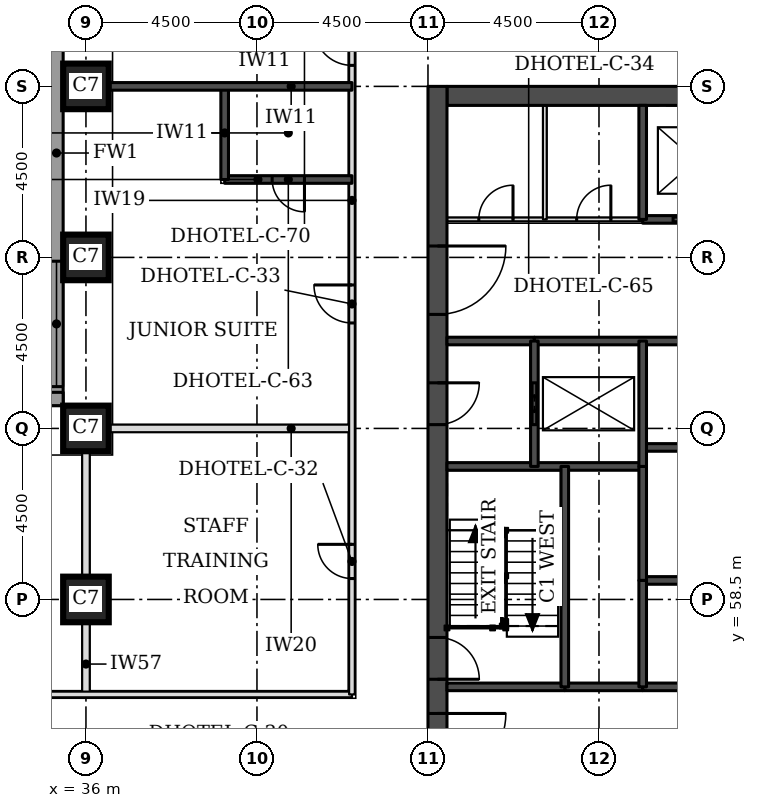
"""IFC4 building model, lengths in metres.
Left out: names, types, materials, properties, quantities, classifications, styles, units other than length and angle.
Written with IfcOpenShell. Run it as: python <this file> out.ifc"""

import sys

from ifc_helpers import new_model, si_unit, direction, frame, frame_2d, origin, origin_2d, place, context, subcontext, project, spatial, rectangle, extrude, element, fill, save


model = new_model("IFC4")
c1 = context("Model", 3, precision=1e-05, world=origin(), true_north=direction((0.0, 1.0)))
c2 = subcontext(c1, "Body", "Model", "MODEL_VIEW")
j1 = project(units=[si_unit("LENGTHUNIT", "METRE"), si_unit("PLANEANGLEUNIT", "RADIAN")], contexts=[c1])
p1 = place(None, origin())
s1 = spatial("IfcSite", under=j1, at=p1, CompositionType="ELEMENT")
p2 = place(p1, origin())
s2 = spatial("IfcBuilding", under=s1, at=p2, CompositionType="ELEMENT")
p3 = place(p2, frame((0.0, 0.0, 56.1)))
s3 = spatial("IfcBuildingStorey", under=s2, at=p3, CompositionType="ELEMENT", Elevation=56.1)
for number, where, z_axis, x_axis in (
    (1, (36.0, 58.5, 0.0), (0.0, 0.0, 1.0), (1.0, 0.0, 0.0)),
    (2, (36.0, 63.0, 0.0), (0.0, 0.0, 1.0), (1.0, 0.0, 0.0)),
    (3, (36.0, 67.5, 0.0), (0.0, 0.0, 1.0), (1.0, 0.0, 0.0)),
    (4, (36.0, 72.0, 0.0), (0.0, 0.0, 1.0), (1.0, 0.0, 0.0)),
):
    element("IfcColumn", number, at=place(p3, frame(where, z_axis=z_axis, x_axis=x_axis)), inside=s3, PredefinedType="COLUMN", context=c2, shape_type="SweptSolid", body=[
        extrude(rectangle(XDim=1.2, YDim=1.2, at=origin_2d()), origin(), (0.0, 0.0, 1.0), 3.3),
    ])
p4 = place(p3, frame((45.5, 71.75, 0.0), z_axis=(0.0, 0.0, 1.0), x_axis=(1.0, 0.0, 0.0)))
e5 = element("IfcWall", 5, at=p4, inside=s3, PredefinedType="SHEAR", context=c2, shape_type="SweptSolid", body=[
    extrude(rectangle(XDim=21.5, YDim=0.5, at=frame_2d((10.75, 0.0))), origin(), (0.0, 0.0, 1.0), 3.3),
])
p5 = place(p3, frame((45.25, 49.5, 0.0), z_axis=(0.0, 0.0, 1.0), x_axis=(0.0, 1.0, 0.0)))
e6 = element("IfcWall", 6, at=p5, inside=s3, PredefinedType="SHEAR", context=c2, shape_type="SweptSolid", body=[
    extrude(rectangle(XDim=22.5, YDim=0.5, at=frame_2d((11.25, 0.0))), origin(), (0.0, 0.0, 1.0), 3.3),
])
p6 = place(p5, frame((4.2, 0.0, 0.0)))
e7 = element("IfcOpeningElement", 7, at=p6, cuts=e6, PredefinedType="OPENING", context=c2, shape_type="SweptSolid", body=[
    extrude(rectangle(XDim=1.8, YDim=2.1, at=frame_2d((0.9, 1.05))), frame((0.0, 0.26, 0.0), z_axis=(0.0, -1.0, 0.0), x_axis=(1.0, 0.0, 0.0)), (0.0, 0.0, 1.0), 0.52),
])
p7 = place(p5, frame((6.9, 0.0, 0.0)))
e8 = element("IfcOpeningElement", 8, at=p7, cuts=e6, PredefinedType="OPENING", context=c2, shape_type="SweptSolid", body=[
    extrude(rectangle(XDim=1.1, YDim=2.1, at=frame_2d((0.55, 1.05))), frame((0.0, 0.26, 0.0), z_axis=(0.0, -1.0, 0.0), x_axis=(1.0, 0.0, 0.0)), (0.0, 0.0, 1.0), 0.52),
])
p8 = place(p5, frame((13.6, 0.0, 0.0)))
e9 = element("IfcOpeningElement", 9, at=p8, cuts=e6, PredefinedType="OPENING", context=c2, shape_type="SweptSolid", body=[
    extrude(rectangle(XDim=1.1, YDim=2.1, at=frame_2d((0.55, 1.05))), frame((0.0, 0.26, 0.0), z_axis=(0.0, -1.0, 0.0), x_axis=(1.0, 0.0, 0.0)), (0.0, 0.0, 1.0), 0.52),
])
p9 = place(p5, frame((16.5, 0.0, 0.0)))
e10 = element("IfcOpeningElement", 10, at=p9, cuts=e6, PredefinedType="OPENING", context=c2, shape_type="SweptSolid", body=[
    extrude(rectangle(XDim=1.8, YDim=2.1, at=frame_2d((0.9, 1.05))), frame((0.0, 0.26, 0.0), z_axis=(0.0, -1.0, 0.0), x_axis=(1.0, 0.0, 0.0)), (0.0, 0.0, 1.0), 0.52),
])
p10 = place(p3, frame((35.225, 76.894, 0.0), z_axis=(0.0, 0.0, 1.0), x_axis=(0.0, -1.0, 0.0)))
e11 = element("IfcWall", 11, at=p10, inside=s3, PredefinedType="STANDARD", context=c2, shape_type="SweptSolid", body=[
    extrude(rectangle(XDim=13.293, YDim=0.35, at=frame_2d((6.647, 0.0))), origin(), (0.0, 0.0, 1.0), 3.055),
])
p11 = place(p10, frame((9.493, 0.0, 0.8)))
e12 = element("IfcOpeningElement", 12, at=p11, cuts=e11, PredefinedType="OPENING", context=c2, shape_type="SweptSolid", body=[
    extrude(rectangle(XDim=3.3, YDim=1.5, at=frame_2d((1.65, 0.75))), frame((0.0, 0.185, 0.0), z_axis=(0.0, -1.0, 0.0), x_axis=(1.0, 0.0, 0.0)), (0.0, 0.0, 1.0), 0.37),
])
p12 = place(p3, frame((35.4, 63.775, 0.0), z_axis=(0.0, 0.0, 1.0), x_axis=(-1.0, 0.0, 0.0)))
e13 = element("IfcWall", 13, at=p12, inside=s3, PredefinedType="STANDARD", context=c2, shape_type="SweptSolid", body=[
    extrude(rectangle(XDim=17.793, YDim=0.35, at=frame_2d((8.897, 0.0))), origin(), (0.0, 0.0, 1.0), 3.055),
])
p13 = place(p12, frame((0.5, 0.0, 0.8)))
e14 = element("IfcOpeningElement", 14, at=p13, cuts=e13, PredefinedType="OPENING", context=c2, shape_type="SweptSolid", body=[
    extrude(rectangle(XDim=3.3, YDim=1.5, at=frame_2d((1.65, 0.75))), frame((0.0, 0.185, 0.0), z_axis=(0.0, -1.0, 0.0), x_axis=(1.0, 0.0, 0.0)), (0.0, 0.0, 1.0), 0.37),
])
p14 = place(p12, frame((9.0, 0.0, 0.8)))
e15 = element("IfcOpeningElement", 15, at=p14, cuts=e13, PredefinedType="OPENING", context=c2, shape_type="SweptSolid", body=[
    extrude(rectangle(XDim=3.3, YDim=1.5, at=frame_2d((1.65, 0.75))), frame((0.0, 0.185, 0.0), z_axis=(0.0, -1.0, 0.0), x_axis=(1.0, 0.0, 0.0)), (0.0, 0.0, 1.0), 0.37),
])
p15 = place(p3, frame((36.0, 56.0, 0.0), z_axis=(0.0, 0.0, 1.0), x_axis=(0.0, 1.0, 0.0)))
e16 = element("IfcWall", 16, at=p15, inside=s3, PredefinedType="PARTITIONING", context=c2, shape_type="SweptSolid", body=[
    extrude(rectangle(XDim=6.4, YDim=0.2, at=frame_2d((3.2, 0.0))), origin(), (0.0, 0.0, 1.0), 2.33),
])
p16 = place(p3, frame((36.6, 63.0, 0.0), z_axis=(0.0, 0.0, 1.0), x_axis=(1.0, 0.0, 0.0)))
e17 = element("IfcWall", 17, at=p16, inside=s3, PredefinedType="PARTITIONING", context=c2, shape_type="SweptSolid", body=[
    extrude(rectangle(XDim=6.4, YDim=0.2, at=frame_2d((3.2, 0.0))), origin(), (0.0, 0.0, 1.0), 3.08),
])
p17 = place(p3, frame((27.0, 56.0, 0.0), z_axis=(0.0, 0.0, 1.0), x_axis=(1.0, 0.0, 0.0)))
e18 = element("IfcWall", 18, at=p17, inside=s3, PredefinedType="PARTITIONING", context=c2, shape_type="SweptSolid", body=[
    extrude(rectangle(XDim=16.0, YDim=0.15, at=frame_2d((8.0, 0.0))), origin(), (0.0, 0.0, 1.0), 3.08),
])
p18 = place(p17, frame((5.225, 0.0, 0.0)))
e19 = element("IfcOpeningElement", 19, at=p18, cuts=e18, PredefinedType="OPENING", context=c2, shape_type="SweptSolid", body=[
    extrude(rectangle(XDim=1.0, YDim=2.1, at=frame_2d((0.5, 1.05))), frame((0.0, 0.085, 0.0), z_axis=(0.0, -1.0, 0.0), x_axis=(1.0, 0.0, 0.0)), (0.0, 0.0, 1.0), 0.17),
])
p19 = place(p3, frame((43.0, 56.0, 0.0), z_axis=(0.0, 0.0, 1.0), x_axis=(0.0, 1.0, 0.0)))
e20 = element("IfcWall", 20, at=p19, inside=s3, PredefinedType="PARTITIONING", context=c2, shape_type="SweptSolid", body=[
    extrude(rectangle(XDim=18.0, YDim=0.15, at=frame_2d((9.0, 0.0))), origin(), (0.0, 0.0, 1.0), 3.08),
])
p20 = place(p19, frame((9.775, 0.0, 0.0)))
e21 = element("IfcOpeningElement", 21, at=p20, cuts=e20, PredefinedType="OPENING", context=c2, shape_type="SweptSolid", body=[
    extrude(rectangle(XDim=1.0, YDim=2.1, at=frame_2d((0.5, 1.05))), frame((0.0, 0.085, 0.0), z_axis=(0.0, -1.0, 0.0), x_axis=(1.0, 0.0, 0.0)), (0.0, 0.0, 1.0), 0.17),
])
p21 = place(p19, frame((16.553, 0.0, 0.0)))
e22 = element("IfcOpeningElement", 22, at=p21, cuts=e20, PredefinedType="OPENING", context=c2, shape_type="SweptSolid", body=[
    extrude(rectangle(XDim=1.0, YDim=2.1, at=frame_2d((0.5, 1.05))), frame((0.0, 0.085, 0.0), z_axis=(0.0, -1.0, 0.0), x_axis=(1.0, 0.0, 0.0)), (0.0, 0.0, 1.0), 0.17),
])
p22 = place(p19, frame((3.05, 0.0, 0.0)))
e23 = element("IfcOpeningElement", 23, at=p22, cuts=e20, PredefinedType="OPENING", context=c2, shape_type="SweptSolid", body=[
    extrude(rectangle(XDim=0.9, YDim=2.1, at=frame_2d((0.45, 1.05))), frame((0.0, 0.085, 0.0), z_axis=(0.0, -1.0, 0.0), x_axis=(1.0, 0.0, 0.0)), (0.0, 0.0, 1.0), 0.17),
])
p23 = place(p3, frame((39.65, 69.55, 0.0), z_axis=(0.0, 0.0, 1.0), x_axis=(1.0, 0.0, 0.0)))
e24 = element("IfcWall", 24, at=p23, inside=s3, PredefinedType="SOLIDWALL", context=c2, shape_type="SweptSolid", body=[
    extrude(rectangle(XDim=3.35, YDim=0.2, at=frame_2d((1.675, 0.0))), origin(), (0.0, 0.0, 1.0), 3.08),
])
p24 = place(p23, frame((1.25, 0.0, 0.0)))
e25 = element("IfcOpeningElement", 25, at=p24, cuts=e24, PredefinedType="OPENING", context=c2, shape_type="SweptSolid", body=[
    extrude(rectangle(XDim=0.85, YDim=2.1, at=frame_2d((0.425, 1.05))), frame((0.0, 0.11, 0.0), z_axis=(0.0, -1.0, 0.0), x_axis=(1.0, 0.0, 0.0)), (0.0, 0.0, 1.0), 0.22),
])
p25 = place(p3, frame((39.65, 69.55, 0.0), z_axis=(0.0, 0.0, 1.0), x_axis=(0.0, 1.0, 0.0)))
e26 = element("IfcWall", 26, at=p25, inside=s3, PredefinedType="SOLIDWALL", context=c2, shape_type="SweptSolid", body=[
    extrude(rectangle(XDim=2.45, YDim=0.2, at=frame_2d((1.225, 0.0))), origin(), (0.0, 0.0, 1.0), 3.08),
])
p26 = place(p3, frame((36.6, 72.0, 0.0), z_axis=(0.0, 0.0, 1.0), x_axis=(1.0, 0.0, 0.0)))
e27 = element("IfcWall", 27, at=p26, inside=s3, PredefinedType="SOLIDWALL", context=c2, shape_type="SweptSolid", body=[
    extrude(rectangle(XDim=6.4, YDim=0.2, at=frame_2d((3.2, 0.0))), origin(), (0.0, 0.0, 1.0), 3.08),
])
p27 = place(p3, frame((48.6, 56.2, 0.0), z_axis=(0.0, 0.0, 1.0), x_axis=(1.0, 0.0, 0.0)))
e28 = element("IfcWall", 28, at=p27, inside=s3, PredefinedType="SOLIDWALL", context=c2, shape_type="SweptSolid", body=[
    extrude(rectangle(XDim=2.05, YDim=0.2, at=frame_2d((1.025, 0.0))), origin(), (0.0, 0.0, 1.0), 3.08),
])
p28 = place(p3, frame((45.5, 56.2, 0.0), z_axis=(0.0, 0.0, 1.0), x_axis=(1.0, 0.0, 0.0)))
e29 = element("IfcWall", 29, at=p28, inside=s3, PredefinedType="SOLIDWALL", context=c2, shape_type="SweptSolid", body=[
    extrude(rectangle(XDim=3.1, YDim=0.2, at=frame_2d((1.55, 0.0))), origin(), (0.0, 0.0, 1.0), 3.08),
])
p29 = place(p3, frame((50.65, 56.2, 0.0), z_axis=(0.0, 0.0, 1.0), x_axis=(1.0, 0.0, 0.0)))
e30 = element("IfcWall", 30, at=p29, inside=s3, PredefinedType="SOLIDWALL", context=c2, shape_type="SweptSolid", body=[
    extrude(rectangle(XDim=11.2, YDim=0.2, at=frame_2d((5.6, 0.0))), origin(), (0.0, 0.0, 1.0), 3.08),
])
p30 = place(p3, frame((50.65, 59.0, 0.0), z_axis=(0.0, 0.0, 1.0), x_axis=(1.0, 0.0, 0.0)))
e31 = element("IfcWall", 31, at=p30, inside=s3, PredefinedType="SOLIDWALL", context=c2, shape_type="SweptSolid", body=[
    extrude(rectangle(XDim=11.2, YDim=0.2, at=frame_2d((5.6, 0.0))), origin(), (0.0, 0.0, 1.0), 3.3),
])
p31 = place(p3, frame((45.5, 62.0, 0.0), z_axis=(0.0, 0.0, 1.0), x_axis=(1.0, 0.0, 0.0)))
e32 = element("IfcWall", 32, at=p31, inside=s3, PredefinedType="SOLIDWALL", context=c2, shape_type="SweptSolid", body=[
    extrude(rectangle(XDim=5.15, YDim=0.2, at=frame_2d((2.575, 0.0))), origin(), (0.0, 0.0, 1.0), 3.08),
])
p32 = place(p3, frame((50.65, 62.5, 0.0), z_axis=(0.0, 0.0, 1.0), x_axis=(1.0, 0.0, 0.0)))
e33 = element("IfcWall", 33, at=p32, inside=s3, PredefinedType="SOLIDWALL", context=c2, shape_type="SweptSolid", body=[
    extrude(rectangle(XDim=11.2, YDim=0.2, at=frame_2d((5.6, 0.0))), origin(), (0.0, 0.0, 1.0), 3.3),
])
p33 = place(p3, frame((45.5, 65.3, 0.0), z_axis=(0.0, 0.0, 1.0), x_axis=(1.0, 0.0, 0.0)))
e34 = element("IfcWall", 34, at=p33, inside=s3, PredefinedType="SOLIDWALL", context=c2, shape_type="SweptSolid", body=[
    extrude(rectangle(XDim=2.3, YDim=0.2, at=frame_2d((1.15, 0.0))), origin(), (0.0, 0.0, 1.0), 3.08),
])
p34 = place(p3, frame((47.8, 65.3, 0.0), z_axis=(0.0, 0.0, 1.0), x_axis=(1.0, 0.0, 0.0)))
e35 = element("IfcWall", 35, at=p34, inside=s3, PredefinedType="SOLIDWALL", context=c2, shape_type="SweptSolid", body=[
    extrude(rectangle(XDim=16.9, YDim=0.2, at=frame_2d((8.45, 0.0))), origin(), (0.0, 0.0, 1.0), 3.08),
])
p35 = place(p3, frame((45.5, 68.5, 0.0), z_axis=(0.0, 0.0, 1.0), x_axis=(1.0, 0.0, 0.0)))
e36 = element("IfcWall", 36, at=p35, inside=s3, PredefinedType="PARTITIONING", context=c2, shape_type="SweptSolid", body=[
    extrude(rectangle(XDim=5.15, YDim=0.1, at=frame_2d((2.575, 0.0))), origin(), (0.0, 0.0, 1.0), 3.08),
])
p36 = place(p35, frame((0.837, 0.0, 0.0)))
e37 = element("IfcOpeningElement", 37, at=p36, cuts=e36, PredefinedType="OPENING", context=c2, shape_type="SweptSolid", body=[
    extrude(rectangle(XDim=0.9, YDim=2.1, at=frame_2d((0.45, 1.05))), frame((0.0, 0.06, 0.0), z_axis=(0.0, -1.0, 0.0), x_axis=(1.0, 0.0, 0.0)), (0.0, 0.0, 1.0), 0.12),
])
p37 = place(p35, frame((3.413, 0.0, 0.0)))
e38 = element("IfcOpeningElement", 38, at=p37, cuts=e36, PredefinedType="OPENING", context=c2, shape_type="SweptSolid", body=[
    extrude(rectangle(XDim=0.9, YDim=2.1, at=frame_2d((0.45, 1.05))), frame((0.0, 0.06, 0.0), z_axis=(0.0, -1.0, 0.0), x_axis=(1.0, 0.0, 0.0)), (0.0, 0.0, 1.0), 0.12),
])
p38 = place(p3, frame((50.65, 68.5, 0.0), z_axis=(0.0, 0.0, 1.0), x_axis=(1.0, 0.0, 0.0)))
e39 = element("IfcWall", 39, at=p38, inside=s3, PredefinedType="SOLIDWALL", context=c2, shape_type="SweptSolid", body=[
    extrude(rectangle(XDim=11.2, YDim=0.2, at=frame_2d((5.6, 0.0))), origin(), (0.0, 0.0, 1.0), 3.08),
])
p39 = place(p38, frame((0.8, 0.0, 0.0)))
e40 = element("IfcOpeningElement", 40, at=p39, cuts=e39, PredefinedType="OPENING", context=c2, shape_type="SweptSolid", body=[
    extrude(rectangle(XDim=1.2, YDim=2.1, at=frame_2d((0.6, 1.05))), frame((0.0, 0.11, 0.0), z_axis=(0.0, -1.0, 0.0), x_axis=(1.0, 0.0, 0.0)), (0.0, 0.0, 1.0), 0.22),
])
p40 = place(p38, frame((3.6, 0.0, 0.0)))
e41 = element("IfcOpeningElement", 41, at=p40, cuts=e39, PredefinedType="OPENING", context=c2, shape_type="SweptSolid", body=[
    extrude(rectangle(XDim=1.2, YDim=2.1, at=frame_2d((0.6, 1.05))), frame((0.0, 0.11, 0.0), z_axis=(0.0, -1.0, 0.0), x_axis=(1.0, 0.0, 0.0)), (0.0, 0.0, 1.0), 0.22),
])
p41 = place(p38, frame((6.4, 0.0, 0.0)))
e42 = element("IfcOpeningElement", 42, at=p41, cuts=e39, PredefinedType="OPENING", context=c2, shape_type="SweptSolid", body=[
    extrude(rectangle(XDim=1.2, YDim=2.1, at=frame_2d((0.6, 1.05))), frame((0.0, 0.11, 0.0), z_axis=(0.0, -1.0, 0.0), x_axis=(1.0, 0.0, 0.0)), (0.0, 0.0, 1.0), 0.22),
])
p42 = place(p38, frame((9.2, 0.0, 0.0)))
e43 = element("IfcOpeningElement", 43, at=p42, cuts=e39, PredefinedType="OPENING", context=c2, shape_type="SweptSolid", body=[
    extrude(rectangle(XDim=1.2, YDim=2.1, at=frame_2d((0.6, 1.05))), frame((0.0, 0.11, 0.0), z_axis=(0.0, -1.0, 0.0), x_axis=(1.0, 0.0, 0.0)), (0.0, 0.0, 1.0), 0.22),
])
p43 = place(p3, frame((47.8, 62.0, 0.0), z_axis=(0.0, 0.0, 1.0), x_axis=(0.0, 1.0, 0.0)))
e44 = element("IfcWall", 44, at=p43, inside=s3, PredefinedType="SOLIDWALL", context=c2, shape_type="SweptSolid", body=[
    extrude(rectangle(XDim=3.3, YDim=0.2, at=frame_2d((1.65, 0.0))), origin(), (0.0, 0.0, 1.0), 3.08),
])
p44 = place(p43, frame((1.1, 0.0, 0.0)))
e45 = element("IfcOpeningElement", 45, at=p44, cuts=e44, PredefinedType="OPENING", context=c2, shape_type="SweptSolid", body=[
    extrude(rectangle(XDim=1.1, YDim=2.1, at=frame_2d((0.55, 1.05))), frame((0.0, 0.11, 0.0), z_axis=(0.0, -1.0, 0.0), x_axis=(1.0, 0.0, 0.0)), (0.0, 0.0, 1.0), 0.22),
])
p45 = place(p3, frame((48.075, 68.5, 0.0), z_axis=(0.0, 0.0, 1.0), x_axis=(0.0, 1.0, 0.0)))
e46 = element("IfcWall", 46, at=p45, inside=s3, PredefinedType="PARTITIONING", context=c2, shape_type="SweptSolid", body=[
    extrude(rectangle(XDim=3.0, YDim=0.1, at=frame_2d((1.5, 0.0))), origin(), (0.0, 0.0, 1.0), 3.08),
])
p46 = place(p3, frame((48.6, 56.2, 0.0), z_axis=(0.0, 0.0, 1.0), x_axis=(0.0, 1.0, 0.0)))
e47 = element("IfcWall", 47, at=p46, inside=s3, PredefinedType="SOLIDWALL", context=c2, shape_type="SweptSolid", body=[
    extrude(rectangle(XDim=5.8, YDim=0.2, at=frame_2d((2.9, 0.0))), origin(), (0.0, 0.0, 1.0), 3.08),
])
p47 = place(p3, frame((50.65, 59.0, 0.0), z_axis=(0.0, 0.0, 1.0), x_axis=(0.0, 1.0, 0.0)))
e48 = element("IfcWall", 48, at=p47, inside=s3, PredefinedType="SOLIDWALL", context=c2, shape_type="SweptSolid", body=[
    extrude(rectangle(XDim=3.0, YDim=0.2, at=frame_2d((1.5, 0.0))), origin(), (0.0, 0.0, 1.0), 3.3),
])
p48 = place(p3, frame((50.65, 56.2, 0.0), z_axis=(0.0, 0.0, 1.0), x_axis=(0.0, 1.0, 0.0)))
e49 = element("IfcWall", 49, at=p48, inside=s3, PredefinedType="SOLIDWALL", context=c2, shape_type="SweptSolid", body=[
    extrude(rectangle(XDim=2.8, YDim=0.2, at=frame_2d((1.4, 0.0))), origin(), (0.0, 0.0, 1.0), 3.08),
])
p49 = place(p3, frame((50.65, 62.0, 0.0), z_axis=(0.0, 0.0, 1.0), x_axis=(0.0, 1.0, 0.0)))
e50 = element("IfcWall", 50, at=p49, inside=s3, PredefinedType="SOLIDWALL", context=c2, shape_type="SweptSolid", body=[
    extrude(rectangle(XDim=3.3, YDim=0.2, at=frame_2d((1.65, 0.0))), origin(), (0.0, 0.0, 1.0), 3.08),
])
p50 = place(p3, frame((50.65, 68.5, 0.0), z_axis=(0.0, 0.0, 1.0), x_axis=(0.0, 1.0, 0.0)))
e51 = element("IfcWall", 51, at=p50, inside=s3, PredefinedType="SOLIDWALL", context=c2, shape_type="SweptSolid", body=[
    extrude(rectangle(XDim=3.0, YDim=0.2, at=frame_2d((1.5, 0.0))), origin(), (0.0, 0.0, 1.0), 3.08),
])
p51 = place(p11, origin())
e52 = element("IfcWindow", 52, at=p51, inside=s3, PartitioningType="SINGLE_PANEL", PredefinedType="WINDOW", context=c2, shape_type="SweptSolid", body=[
    extrude(rectangle(XDim=3.3, YDim=1.5, at=frame_2d((1.65, 0.75))), frame((0.0, 0.085, 0.0), z_axis=(0.0, -1.0, 0.0), x_axis=(1.0, 0.0, 0.0)), (0.0, 0.0, 1.0), 0.06),
])
fill(e12, e52)
p52 = place(p20, origin())
e53 = element("IfcDoor", 53, at=p52, inside=s3, OperationType="SINGLE_SWING_RIGHT", PredefinedType="DOOR", context=c2, shape_type="SweptSolid", body=[
    extrude(rectangle(XDim=1.0, YDim=2.1, at=frame_2d((0.5, 1.05))), frame((0.0, 0.025, 0.0), z_axis=(0.0, -1.0, 0.0), x_axis=(1.0, 0.0, 0.0)), (0.0, 0.0, 1.0), 0.05),
])
fill(e21, e53)
p53 = place(p24, frame((0.85, 0.0, 0.0), z_axis=(0.0, 0.0, 1.0), x_axis=(-1.0, 0.0, 0.0)))
e54 = element("IfcDoor", 54, at=p53, inside=s3, OperationType="SINGLE_SWING_LEFT", PredefinedType="DOOR", context=c2, shape_type="SweptSolid", body=[
    extrude(rectangle(XDim=0.85, YDim=2.1, at=frame_2d((0.425, 1.05))), frame((0.0, 0.025, 0.0), z_axis=(0.0, -1.0, 0.0), x_axis=(1.0, 0.0, 0.0)), (0.0, 0.0, 1.0), 0.05),
])
fill(e25, e54)
p54 = place(p21, origin())
e55 = element("IfcDoor", 55, at=p54, inside=s3, OperationType="SINGLE_SWING_RIGHT", PredefinedType="DOOR", context=c2, shape_type="SweptSolid", body=[
    extrude(rectangle(XDim=1.0, YDim=2.1, at=frame_2d((0.5, 1.05))), frame((0.0, 0.025, 0.0), z_axis=(0.0, -1.0, 0.0), x_axis=(1.0, 0.0, 0.0)), (0.0, 0.0, 1.0), 0.05),
])
fill(e22, e55)
p55 = place(p22, origin())
e56 = element("IfcDoor", 56, at=p55, inside=s3, OperationType="SINGLE_SWING_RIGHT", PredefinedType="DOOR", context=c2, shape_type="SweptSolid", body=[
    extrude(rectangle(XDim=0.9, YDim=2.1, at=frame_2d((0.45, 1.05))), frame((0.0, 0.025, 0.0), z_axis=(0.0, -1.0, 0.0), x_axis=(1.0, 0.0, 0.0)), (0.0, 0.0, 1.0), 0.05),
])
fill(e23, e56)
p56 = place(p39, origin())
e57 = element("IfcDoor", 57, at=p56, inside=s3, OperationType="DOUBLE_DOOR_SLIDING", PredefinedType="DOOR", context=c2, shape_type="SweptSolid", body=[
    extrude(rectangle(XDim=1.2, YDim=2.1, at=frame_2d((0.6, 1.05))), frame((0.0, 0.025, 0.0), z_axis=(0.0, -1.0, 0.0), x_axis=(1.0, 0.0, 0.0)), (0.0, 0.0, 1.0), 0.05),
])
fill(e40, e57)
p57 = place(p44, origin())
e58 = element("IfcDoor", 58, at=p57, inside=s3, OperationType="DOUBLE_DOOR_SLIDING", PredefinedType="DOOR", context=c2, shape_type="SweptSolid", body=[
    extrude(rectangle(XDim=1.1, YDim=2.1, at=frame_2d((0.55, 1.05))), frame((0.0, 0.025, 0.0), z_axis=(0.0, -1.0, 0.0), x_axis=(1.0, 0.0, 0.0)), (0.0, 0.0, 1.0), 0.05),
])
fill(e45, e58)
p58 = place(p6, frame((1.8, 0.0, 0.0), z_axis=(0.0, 0.0, 1.0), x_axis=(-1.0, 0.0, 0.0)))
e59 = element("IfcDoor", 59, at=p58, inside=s3, OperationType="SINGLE_SWING_LEFT", PredefinedType="DOOR", context=c2, shape_type="SweptSolid", body=[
    extrude(rectangle(XDim=1.8, YDim=2.1, at=frame_2d((0.9, 1.05))), frame((0.0, 0.025, 0.0), z_axis=(0.0, -1.0, 0.0), x_axis=(1.0, 0.0, 0.0)), (0.0, 0.0, 1.0), 0.05),
])
fill(e7, e59)
p59 = place(p7, frame((1.1, 0.0, 0.0), z_axis=(0.0, 0.0, 1.0), x_axis=(-1.0, 0.0, 0.0)))
e60 = element("IfcDoor", 60, at=p59, inside=s3, OperationType="SINGLE_SWING_RIGHT", PredefinedType="DOOR", context=c2, shape_type="SweptSolid", body=[
    extrude(rectangle(XDim=1.1, YDim=2.1, at=frame_2d((0.55, 1.05))), frame((0.0, 0.025, 0.0), z_axis=(0.0, -1.0, 0.0), x_axis=(1.0, 0.0, 0.0)), (0.0, 0.0, 1.0), 0.05),
])
fill(e8, e60)
p60 = place(p8, frame((1.1, 0.0, 0.0), z_axis=(0.0, 0.0, 1.0), x_axis=(-1.0, 0.0, 0.0)))
e61 = element("IfcDoor", 61, at=p60, inside=s3, OperationType="SINGLE_SWING_LEFT", PredefinedType="DOOR", context=c2, shape_type="SweptSolid", body=[
    extrude(rectangle(XDim=1.1, YDim=2.1, at=frame_2d((0.55, 1.05))), frame((0.0, 0.025, 0.0), z_axis=(0.0, -1.0, 0.0), x_axis=(1.0, 0.0, 0.0)), (0.0, 0.0, 1.0), 0.05),
])
fill(e9, e61)
p61 = place(p9, frame((1.8, 0.0, 0.0), z_axis=(0.0, 0.0, 1.0), x_axis=(-1.0, 0.0, 0.0)))
e62 = element("IfcDoor", 62, at=p61, inside=s3, OperationType="SINGLE_SWING_LEFT", PredefinedType="DOOR", context=c2, shape_type="SweptSolid", body=[
    extrude(rectangle(XDim=1.8, YDim=2.1, at=frame_2d((0.9, 1.05))), frame((0.0, 0.025, 0.0), z_axis=(0.0, -1.0, 0.0), x_axis=(1.0, 0.0, 0.0)), (0.0, 0.0, 1.0), 0.05),
])
fill(e10, e62)
p62 = place(p36, origin())
e63 = element("IfcDoor", 63, at=p62, inside=s3, OperationType="SINGLE_SWING_RIGHT", PredefinedType="DOOR", context=c2, shape_type="SweptSolid", body=[
    extrude(rectangle(XDim=0.9, YDim=2.1, at=frame_2d((0.45, 1.05))), frame((0.0, 0.025, 0.0), z_axis=(0.0, -1.0, 0.0), x_axis=(1.0, 0.0, 0.0)), (0.0, 0.0, 1.0), 0.05),
])
fill(e37, e63)
p63 = place(p37, origin())
e64 = element("IfcDoor", 64, at=p63, inside=s3, OperationType="SINGLE_SWING_RIGHT", PredefinedType="DOOR", context=c2, shape_type="SweptSolid", body=[
    extrude(rectangle(XDim=0.9, YDim=2.1, at=frame_2d((0.45, 1.05))), frame((0.0, 0.025, 0.0), z_axis=(0.0, -1.0, 0.0), x_axis=(1.0, 0.0, 0.0)), (0.0, 0.0, 1.0), 0.05),
])
fill(e38, e64)
save(model, sys.argv[1])
